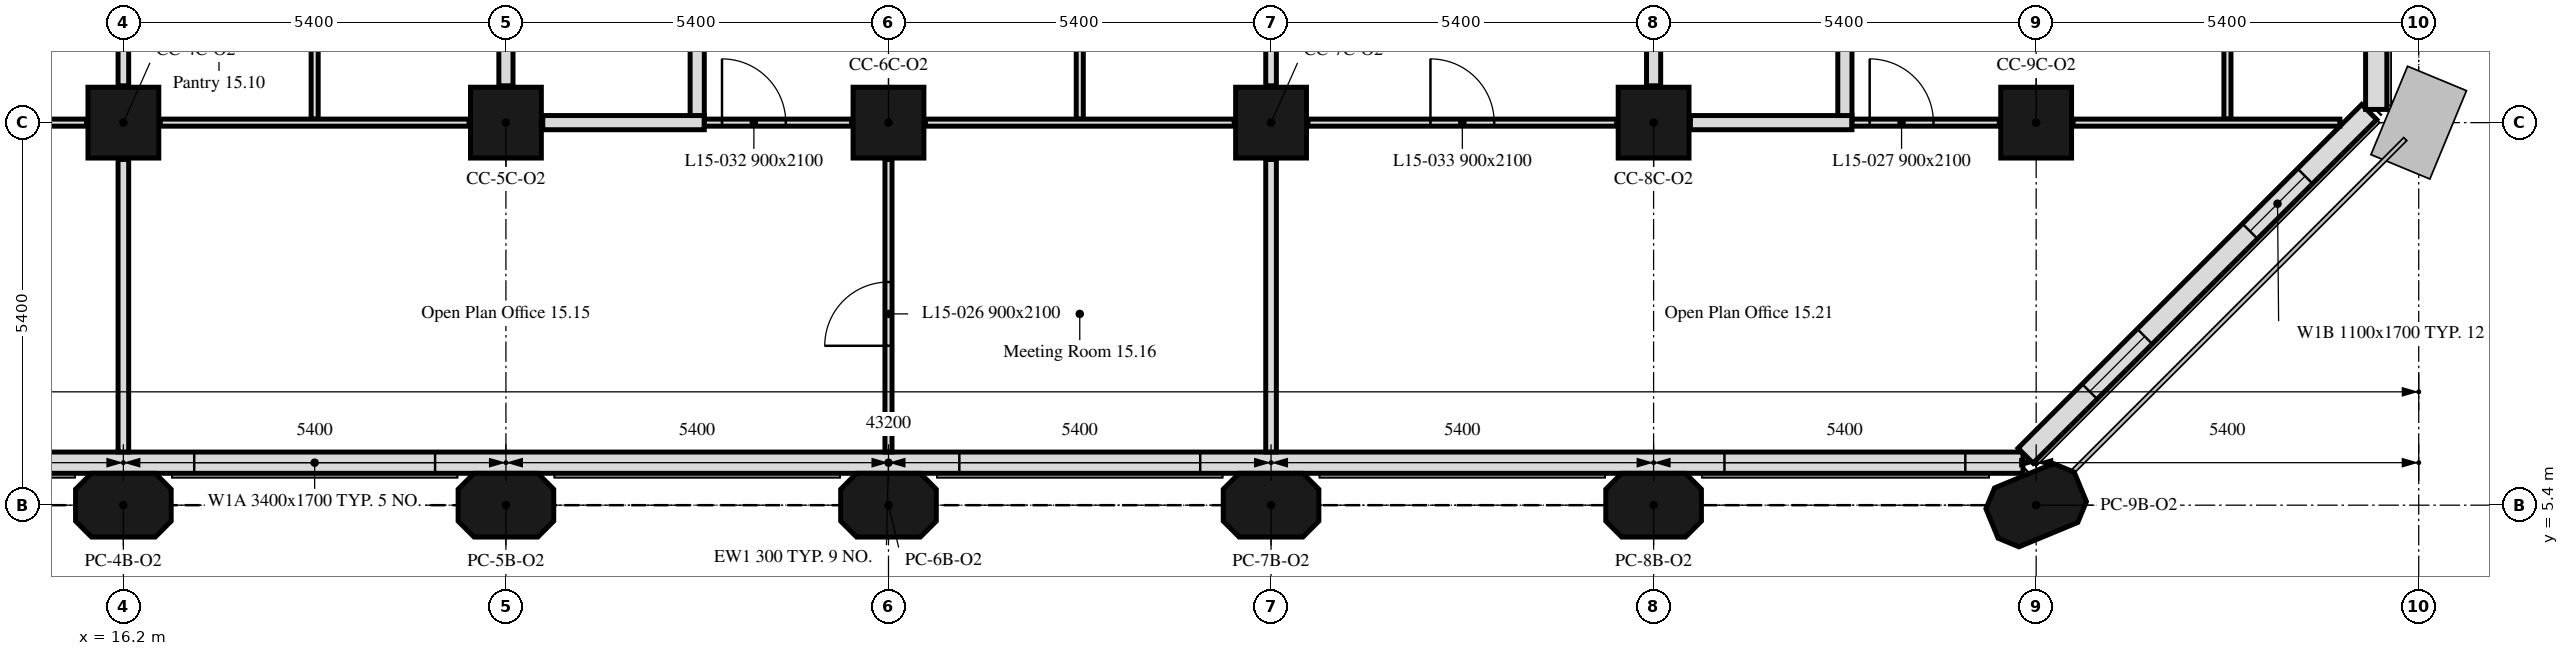
"""IFC4 building model, lengths in metres.
Left out: names, types, materials, properties, quantities, classifications, styles, units other than length and angle.
Written with IfcOpenShell. Run it as: python <this file> out.ifc"""

import sys

from ifc_helpers import new_model, si_unit, direction, frame, frame_2d, origin, origin_2d, place, context, subcontext, project, spatial, polyline, rectangle, outline, extrude, element, fill, save


model = new_model("IFC4")
c1 = context("Model", 3, precision=1e-05, world=origin(), true_north=direction((0.0, 1.0)))
c2 = subcontext(c1, "Body", "Model", "MODEL_VIEW")
j1 = project(units=[si_unit("LENGTHUNIT", "METRE"), si_unit("PLANEANGLEUNIT", "RADIAN")], contexts=[c1])
p1 = place(None, origin())
s1 = spatial("IfcSite", under=j1, at=p1, CompositionType="ELEMENT")
p2 = place(p1, origin())
s2 = spatial("IfcBuilding", under=s1, at=p2, CompositionType="ELEMENT")
p3 = place(p2, frame((0.0, 0.0, 68.8)))
s3 = spatial("IfcBuildingStorey", under=s2, at=p3, CompositionType="ELEMENT", Elevation=68.8)
for number, where, z_axis, x_axis in (
    (1, (16.2, 5.4, 0.0), (0.0, 0.0, 1.0), (1.0, 0.0, 0.0)),
    (2, (21.6, 5.4, 0.0), (0.0, 0.0, 1.0), (1.0, 0.0, 0.0)),
    (3, (27.0, 5.4, 0.0), (0.0, 0.0, 1.0), (1.0, 0.0, 0.0)),
    (4, (32.4, 5.4, 0.0), (0.0, 0.0, 1.0), (1.0, 0.0, 0.0)),
    (5, (37.8, 5.4, 0.0), (0.0, 0.0, 1.0), (1.0, 0.0, 0.0)),
    (6, (43.2, 5.4, 0.0), (0.0, 0.0, 1.0), (0.924, 0.383, 0.0)),
):
    element("IfcColumn", number, at=place(p3, frame(where, z_axis=z_axis, x_axis=x_axis)), inside=s3, PredefinedType="COLUMN", context=c2, shape_type="SweptSolid", body=[
        extrude(outline(polyline([(-0.45, -0.45), (0.45, -0.45), (0.675, -0.225), (0.675, 0.225), (0.45, 0.45), (-0.45, 0.45), (-0.675, 0.225), (-0.675, -0.225), (-0.45, -0.45)])), origin(), (0.0, 0.0, 1.0), 3.5),
    ])
for number, where, z_axis, x_axis in (
    (7, (16.2, 10.8, 0.0), (0.0, 0.0, 1.0), (1.0, 0.0, 0.0)),
    (8, (21.6, 10.8, 0.0), (0.0, 0.0, 1.0), (1.0, 0.0, 0.0)),
    (9, (27.0, 10.8, 0.0), (0.0, 0.0, 1.0), (1.0, 0.0, 0.0)),
    (10, (32.4, 10.8, 0.0), (0.0, 0.0, 1.0), (1.0, 0.0, 0.0)),
    (11, (37.8, 10.8, 0.0), (0.0, 0.0, 1.0), (1.0, 0.0, 0.0)),
    (12, (43.2, 10.8, 0.0), (0.0, 0.0, 1.0), (1.0, 0.0, 0.0)),
):
    element("IfcColumn", number, at=place(p3, frame(where, z_axis=z_axis, x_axis=x_axis)), inside=s3, PredefinedType="COLUMN", context=c2, shape_type="SweptSolid", body=[
        extrude(rectangle(XDim=1.0, YDim=1.0, at=origin_2d()), origin(), (0.0, 0.0, 1.0), 3.5),
    ])
p4 = place(p3, frame((10.986, 6.0, 0.0), z_axis=(0.0, 0.0, 1.0), x_axis=(1.0, 0.0, 0.0)))
e13 = element("IfcWall", 13, at=p4, inside=s3, PredefinedType="SOLIDWALL", context=c2, shape_type="SweptSolid", body=[
    extrude(rectangle(XDim=32.027, YDim=0.3, at=frame_2d((16.014, 0.0))), origin(), (0.0, 0.0, 1.0), 3.5),
])
p5 = place(p4, frame((6.214, 0.0, 0.9)))
e14 = element("IfcOpeningElement", 14, at=p5, cuts=e13, PredefinedType="OPENING", context=c2, shape_type="SweptSolid", body=[
    extrude(rectangle(XDim=3.4, YDim=1.7, at=frame_2d((1.7, 0.85))), frame((0.0, 0.16, 0.0), z_axis=(0.0, -1.0, 0.0), x_axis=(1.0, 0.0, 0.0)), (0.0, 0.0, 1.0), 0.32),
])
p6 = place(p4, frame((17.014, 0.0, 0.9)))
e15 = element("IfcOpeningElement", 15, at=p6, cuts=e13, PredefinedType="OPENING", context=c2, shape_type="SweptSolid", body=[
    extrude(rectangle(XDim=3.4, YDim=1.7, at=frame_2d((1.7, 0.85))), frame((0.0, 0.16, 0.0), z_axis=(0.0, -1.0, 0.0), x_axis=(1.0, 0.0, 0.0)), (0.0, 0.0, 1.0), 0.32),
])
p7 = place(p4, frame((27.814, 0.0, 0.9)))
e16 = element("IfcOpeningElement", 16, at=p7, cuts=e13, PredefinedType="OPENING", context=c2, shape_type="SweptSolid", body=[
    extrude(rectangle(XDim=3.4, YDim=1.7, at=frame_2d((1.7, 0.85))), frame((0.0, 0.16, 0.0), z_axis=(0.0, -1.0, 0.0), x_axis=(1.0, 0.0, 0.0)), (0.0, 0.0, 1.0), 0.32),
])
p8 = place(p3, frame((43.051, 6.099, 0.0), z_axis=(0.0, 0.0, 1.0), x_axis=(0.707106781187, 0.707106781187, 0.0)))
e17 = element("IfcWall", 17, at=p8, inside=s3, PredefinedType="SOLIDWALL", context=c2, shape_type="SweptSolid", body=[
    extrude(rectangle(XDim=6.86, YDim=0.3, at=frame_2d((3.43, 0.0))), origin(), (0.0, 0.0, 1.0), 3.5),
])
p9 = place(p8, frame((1.28, 0.0, 0.9)))
e18 = element("IfcOpeningElement", 18, at=p9, cuts=e17, PredefinedType="OPENING", context=c2, shape_type="SweptSolid", body=[
    extrude(rectangle(XDim=1.1, YDim=1.7, at=frame_2d((0.55, 0.85))), frame((0.0, 0.16, 0.0), z_axis=(0.0, -1.0, 0.0), x_axis=(1.0, 0.0, 0.0)), (0.0, 0.0, 1.0), 0.32),
])
p10 = place(p8, frame((4.48, 0.0, 0.9)))
e19 = element("IfcOpeningElement", 19, at=p10, cuts=e17, PredefinedType="OPENING", context=c2, shape_type="SweptSolid", body=[
    extrude(rectangle(XDim=1.1, YDim=1.7, at=frame_2d((0.55, 0.85))), frame((0.0, 0.16, 0.0), z_axis=(0.0, -1.0, 0.0), x_axis=(1.0, 0.0, 0.0)), (0.0, 0.0, 1.0), 0.32),
])
p11 = place(p3, frame((48.0, 10.986, 0.0), z_axis=(0.0, 0.0, 1.0), x_axis=(0.0, 1.0, 0.0)))
e20 = element("IfcWall", 20, at=p11, inside=s3, PredefinedType="SOLIDWALL", context=c2, shape_type="SweptSolid", body=[
    extrude(rectangle(XDim=32.027, YDim=0.3, at=frame_2d((16.014, 0.0))), origin(), (0.0, 0.0, 1.0), 3.5),
])
p12 = place(p11, frame((27.814, 0.0, 0.9)))
e21 = element("IfcOpeningElement", 21, at=p12, cuts=e20, PredefinedType="OPENING", context=c2, shape_type="SweptSolid", body=[
    extrude(rectangle(XDim=3.4, YDim=1.7, at=frame_2d((1.7, 0.85))), frame((0.0, 0.16, 0.0), z_axis=(0.0, -1.0, 0.0), x_axis=(1.0, 0.0, 0.0)), (0.0, 0.0, 1.0), 0.32),
])
p13 = place(p3, frame((11.32, 10.8, 0.0), z_axis=(0.0, 0.0, 1.0), x_axis=(1.0, 0.0, 0.0)))
e22 = element("IfcWall", 22, at=p13, inside=s3, PredefinedType="PARTITIONING", context=c2, shape_type="SweptSolid", body=[
    extrude(rectangle(XDim=4.36, YDim=0.1, at=frame_2d((2.18, 0.0))), origin(), (0.0, 0.0, 1.0), 3.5),
])
p14 = place(p3, frame((16.2, 11.32, 0.0), z_axis=(0.0, 0.0, 1.0), x_axis=(0.0, 1.0, 0.0)))
e23 = element("IfcWall", 23, at=p14, inside=s3, PredefinedType="PARTITIONING", context=c2, shape_type="SweptSolid", body=[
    extrude(rectangle(XDim=2.105, YDim=0.15, at=frame_2d((1.052, 0.0))), origin(), (0.0, 0.0, 1.0), 3.5),
])
p15 = place(p3, frame((16.2, 6.151, 0.0), z_axis=(0.0, 0.0, 1.0), x_axis=(0.0, 1.0, 0.0)))
e24 = element("IfcWall", 24, at=p15, inside=s3, PredefinedType="PARTITIONING", context=c2, shape_type="SweptSolid", body=[
    extrude(rectangle(XDim=4.129, YDim=0.15, at=frame_2d((2.064, 0.0))), origin(), (0.0, 0.0, 1.0), 3.5),
])
p16 = place(p3, frame((18.9, 10.85, 0.0), z_axis=(0.0, 0.0, 1.0), x_axis=(0.0, 1.0, 0.0)))
e25 = element("IfcWall", 25, at=p16, inside=s3, PredefinedType="PARTITIONING", context=c2, shape_type="SweptSolid", body=[
    extrude(rectangle(XDim=2.575, YDim=0.1, at=frame_2d((1.288, 0.0))), origin(), (0.0, 0.0, 1.0), 3.5),
])
p17 = place(p3, frame((16.72, 10.8, 0.0), z_axis=(0.0, 0.0, 1.0), x_axis=(1.0, 0.0, 0.0)))
e26 = element("IfcWall", 26, at=p17, inside=s3, PredefinedType="PARTITIONING", context=c2, shape_type="SweptSolid", body=[
    extrude(rectangle(XDim=4.36, YDim=0.1, at=frame_2d((2.18, 0.0))), origin(), (0.0, 0.0, 1.0), 3.5),
])
p18 = place(p3, frame((21.6, 11.32, 0.0), z_axis=(0.0, 0.0, 1.0), x_axis=(0.0, 1.0, 0.0)))
e27 = element("IfcWall", 27, at=p18, inside=s3, PredefinedType="PARTITIONING", context=c2, shape_type="SweptSolid", body=[
    extrude(rectangle(XDim=2.08, YDim=0.2, at=frame_2d((1.04, 0.0))), origin(), (0.0, 0.0, 1.0), 3.5),
])
p19 = place(p3, frame((22.12, 10.8, 0.0), z_axis=(0.0, 0.0, 1.0), x_axis=(1.0, 0.0, 0.0)))
e28 = element("IfcWall", 28, at=p19, inside=s3, PredefinedType="PARTITIONING", context=c2, shape_type="SweptSolid", body=[
    extrude(rectangle(XDim=2.28, YDim=0.2, at=frame_2d((1.14, 0.0))), origin(), (0.0, 0.0, 1.0), 3.5),
])
p20 = place(p3, frame((24.3, 10.9, 0.0), z_axis=(0.0, 0.0, 1.0), x_axis=(0.0, 1.0, 0.0)))
e29 = element("IfcWall", 29, at=p20, inside=s3, PredefinedType="PARTITIONING", context=c2, shape_type="SweptSolid", body=[
    extrude(rectangle(XDim=2.5, YDim=0.2, at=frame_2d((1.25, 0.0))), origin(), (0.0, 0.0, 1.0), 3.5),
])
p21 = place(p3, frame((24.4, 10.8, 0.0), z_axis=(0.0, 0.0, 1.0), x_axis=(1.0, 0.0, 0.0)))
e30 = element("IfcWall", 30, at=p21, inside=s3, PredefinedType="PARTITIONING", context=c2, shape_type="SweptSolid", body=[
    extrude(rectangle(XDim=2.08, YDim=0.1, at=frame_2d((1.04, 0.0))), origin(), (0.0, 0.0, 1.0), 3.5),
])
p22 = place(p21, frame((0.25, 0.0, 0.0)))
e31 = element("IfcOpeningElement", 31, at=p22, cuts=e30, PredefinedType="OPENING", context=c2, shape_type="SweptSolid", body=[
    extrude(rectangle(XDim=0.9, YDim=2.1, at=frame_2d((0.45, 1.05))), frame((0.0, 0.05, 0.0), z_axis=(0.0, -1.0, 0.0), x_axis=(1.0, 0.0, 0.0)), (0.0, 0.0, 1.0), 0.1),
])
p23 = place(p3, frame((29.7, 10.85, 0.0), z_axis=(0.0, 0.0, 1.0), x_axis=(0.0, 1.0, 0.0)))
e32 = element("IfcWall", 32, at=p23, inside=s3, PredefinedType="PARTITIONING", context=c2, shape_type="SweptSolid", body=[
    extrude(rectangle(XDim=2.575, YDim=0.1, at=frame_2d((1.288, 0.0))), origin(), (0.0, 0.0, 1.0), 3.5),
])
p24 = place(p23, frame((1.425, 0.0, 0.0)))
e33 = element("IfcOpeningElement", 33, at=p24, cuts=e32, PredefinedType="OPENING", context=c2, shape_type="SweptSolid", body=[
    extrude(rectangle(XDim=0.9, YDim=2.1, at=frame_2d((0.45, 1.05))), frame((0.0, 0.05, 0.0), z_axis=(0.0, -1.0, 0.0), x_axis=(1.0, 0.0, 0.0)), (0.0, 0.0, 1.0), 0.1),
])
p25 = place(p3, frame((27.52, 10.8, 0.0), z_axis=(0.0, 0.0, 1.0), x_axis=(1.0, 0.0, 0.0)))
e34 = element("IfcWall", 34, at=p25, inside=s3, PredefinedType="PARTITIONING", context=c2, shape_type="SweptSolid", body=[
    extrude(rectangle(XDim=4.36, YDim=0.1, at=frame_2d((2.18, 0.0))), origin(), (0.0, 0.0, 1.0), 3.5),
])
p26 = place(p3, frame((32.4, 11.32, 0.0), z_axis=(0.0, 0.0, 1.0), x_axis=(0.0, 1.0, 0.0)))
e35 = element("IfcWall", 35, at=p26, inside=s3, PredefinedType="PARTITIONING", context=c2, shape_type="SweptSolid", body=[
    extrude(rectangle(XDim=2.105, YDim=0.15, at=frame_2d((1.052, 0.0))), origin(), (0.0, 0.0, 1.0), 3.5),
])
p27 = place(p3, frame((27.0, 6.151, 0.0), z_axis=(0.0, 0.0, 1.0), x_axis=(0.0, 1.0, 0.0)))
e36 = element("IfcWall", 36, at=p27, inside=s3, PredefinedType="PARTITIONING", context=c2, shape_type="SweptSolid", body=[
    extrude(rectangle(XDim=4.129, YDim=0.1, at=frame_2d((2.064, 0.0))), origin(), (0.0, 0.0, 1.0), 3.5),
])
p28 = place(p27, frame((1.499, 0.0, 0.0)))
e37 = element("IfcOpeningElement", 37, at=p28, cuts=e36, PredefinedType="OPENING", context=c2, shape_type="SweptSolid", body=[
    extrude(rectangle(XDim=0.9, YDim=2.1, at=frame_2d((0.45, 1.05))), frame((0.0, 0.05, 0.0), z_axis=(0.0, -1.0, 0.0), x_axis=(1.0, 0.0, 0.0)), (0.0, 0.0, 1.0), 0.1),
])
p29 = place(p3, frame((32.4, 6.151, 0.0), z_axis=(0.0, 0.0, 1.0), x_axis=(0.0, 1.0, 0.0)))
e38 = element("IfcWall", 38, at=p29, inside=s3, PredefinedType="PARTITIONING", context=c2, shape_type="SweptSolid", body=[
    extrude(rectangle(XDim=4.129, YDim=0.15, at=frame_2d((2.064, 0.0))), origin(), (0.0, 0.0, 1.0), 3.5),
])
p30 = place(p3, frame((32.92, 10.8, 0.0), z_axis=(0.0, 0.0, 1.0), x_axis=(1.0, 0.0, 0.0)))
e39 = element("IfcWall", 39, at=p30, inside=s3, PredefinedType="PARTITIONING", context=c2, shape_type="SweptSolid", body=[
    extrude(rectangle(XDim=4.36, YDim=0.1, at=frame_2d((2.18, 0.0))), origin(), (0.0, 0.0, 1.0), 3.5),
])
p31 = place(p30, frame((1.73, 0.0, 0.0)))
e40 = element("IfcOpeningElement", 40, at=p31, cuts=e39, PredefinedType="OPENING", context=c2, shape_type="SweptSolid", body=[
    extrude(rectangle(XDim=0.9, YDim=2.1, at=frame_2d((0.45, 1.05))), frame((0.0, 0.05, 0.0), z_axis=(0.0, -1.0, 0.0), x_axis=(1.0, 0.0, 0.0)), (0.0, 0.0, 1.0), 0.1),
])
p32 = place(p3, frame((37.8, 11.32, 0.0), z_axis=(0.0, 0.0, 1.0), x_axis=(0.0, 1.0, 0.0)))
e41 = element("IfcWall", 41, at=p32, inside=s3, PredefinedType="PARTITIONING", context=c2, shape_type="SweptSolid", body=[
    extrude(rectangle(XDim=2.08, YDim=0.2, at=frame_2d((1.04, 0.0))), origin(), (0.0, 0.0, 1.0), 3.5),
])
p33 = place(p3, frame((38.32, 10.8, 0.0), z_axis=(0.0, 0.0, 1.0), x_axis=(1.0, 0.0, 0.0)))
e42 = element("IfcWall", 42, at=p33, inside=s3, PredefinedType="PARTITIONING", context=c2, shape_type="SweptSolid", body=[
    extrude(rectangle(XDim=2.28, YDim=0.2, at=frame_2d((1.14, 0.0))), origin(), (0.0, 0.0, 1.0), 3.5),
])
p34 = place(p3, frame((40.5, 10.9, 0.0), z_axis=(0.0, 0.0, 1.0), x_axis=(0.0, 1.0, 0.0)))
e43 = element("IfcWall", 43, at=p34, inside=s3, PredefinedType="PARTITIONING", context=c2, shape_type="SweptSolid", body=[
    extrude(rectangle(XDim=2.5, YDim=0.2, at=frame_2d((1.25, 0.0))), origin(), (0.0, 0.0, 1.0), 3.5),
])
p35 = place(p3, frame((40.6, 10.8, 0.0), z_axis=(0.0, 0.0, 1.0), x_axis=(1.0, 0.0, 0.0)))
e44 = element("IfcWall", 44, at=p35, inside=s3, PredefinedType="PARTITIONING", context=c2, shape_type="SweptSolid", body=[
    extrude(rectangle(XDim=2.08, YDim=0.1, at=frame_2d((1.04, 0.0))), origin(), (0.0, 0.0, 1.0), 3.5),
])
p36 = place(p35, frame((0.25, 0.0, 0.0)))
e45 = element("IfcOpeningElement", 45, at=p36, cuts=e44, PredefinedType="OPENING", context=c2, shape_type="SweptSolid", body=[
    extrude(rectangle(XDim=0.9, YDim=2.1, at=frame_2d((0.45, 1.05))), frame((0.0, 0.05, 0.0), z_axis=(0.0, -1.0, 0.0), x_axis=(1.0, 0.0, 0.0)), (0.0, 0.0, 1.0), 0.1),
])
p37 = place(p3, frame((45.9, 10.85, 0.0), z_axis=(0.0, 0.0, 1.0), x_axis=(0.0, 1.0, 0.0)))
e46 = element("IfcWall", 46, at=p37, inside=s3, PredefinedType="PARTITIONING", context=c2, shape_type="SweptSolid", body=[
    extrude(rectangle(XDim=2.575, YDim=0.1, at=frame_2d((1.288, 0.0))), origin(), (0.0, 0.0, 1.0), 3.5),
])
p38 = place(p3, frame((43.72, 10.8, 0.0), z_axis=(0.0, 0.0, 1.0), x_axis=(1.0, 0.0, 0.0)))
e47 = element("IfcWall", 47, at=p38, inside=s3, PredefinedType="PARTITIONING", context=c2, shape_type="SweptSolid", body=[
    extrude(rectangle(XDim=3.768, YDim=0.1, at=frame_2d((1.884, 0.0))), origin(), (0.0, 0.0, 1.0), 3.5),
])
p39 = place(p5, origin())
e48 = element("IfcWindow", 48, at=p39, inside=s3, PartitioningType="SINGLE_PANEL", PredefinedType="WINDOW", context=c2, shape_type="SweptSolid", body=[
    extrude(rectangle(XDim=3.4, YDim=1.7, at=frame_2d((1.7, 0.85))), frame((0.0, 0.03, 0.0), z_axis=(0.0, -1.0, 0.0), x_axis=(1.0, 0.0, 0.0)), (0.0, 0.0, 1.0), 0.06),
])
fill(e14, e48)
p40 = place(p6, origin())
e49 = element("IfcWindow", 49, at=p40, inside=s3, PartitioningType="SINGLE_PANEL", PredefinedType="WINDOW", context=c2, shape_type="SweptSolid", body=[
    extrude(rectangle(XDim=3.4, YDim=1.7, at=frame_2d((1.7, 0.85))), frame((0.0, 0.03, 0.0), z_axis=(0.0, -1.0, 0.0), x_axis=(1.0, 0.0, 0.0)), (0.0, 0.0, 1.0), 0.06),
])
fill(e15, e49)
p41 = place(p7, origin())
e50 = element("IfcWindow", 50, at=p41, inside=s3, PartitioningType="SINGLE_PANEL", PredefinedType="WINDOW", context=c2, shape_type="SweptSolid", body=[
    extrude(rectangle(XDim=3.4, YDim=1.7, at=frame_2d((1.7, 0.85))), frame((0.0, 0.03, 0.0), z_axis=(0.0, -1.0, 0.0), x_axis=(1.0, 0.0, 0.0)), (0.0, 0.0, 1.0), 0.06),
])
fill(e16, e50)
p42 = place(p9, origin())
e51 = element("IfcWindow", 51, at=p42, inside=s3, PartitioningType="SINGLE_PANEL", PredefinedType="WINDOW", context=c2, shape_type="SweptSolid", body=[
    extrude(rectangle(XDim=1.1, YDim=1.7, at=frame_2d((0.55, 0.85))), frame((0.0, 0.03, 0.0), z_axis=(0.0, -1.0, 0.0), x_axis=(1.0, 0.0, 0.0)), (0.0, 0.0, 1.0), 0.06),
])
fill(e18, e51)
p43 = place(p10, origin())
e52 = element("IfcWindow", 52, at=p43, inside=s3, PartitioningType="SINGLE_PANEL", PredefinedType="WINDOW", context=c2, shape_type="SweptSolid", body=[
    extrude(rectangle(XDim=1.1, YDim=1.7, at=frame_2d((0.55, 0.85))), frame((0.0, 0.03, 0.0), z_axis=(0.0, -1.0, 0.0), x_axis=(1.0, 0.0, 0.0)), (0.0, 0.0, 1.0), 0.06),
])
fill(e19, e52)
p44 = place(p28, origin())
e53 = element("IfcDoor", 53, at=p44, inside=s3, OperationType="SINGLE_SWING_LEFT", PredefinedType="DOOR", context=c2, shape_type="SweptSolid", body=[
    extrude(rectangle(XDim=0.9, YDim=2.1, at=frame_2d((0.45, 1.05))), frame((0.0, 0.025, 0.0), z_axis=(0.0, -1.0, 0.0), x_axis=(1.0, 0.0, 0.0)), (0.0, 0.0, 1.0), 0.05),
])
fill(e37, e53)
p45 = place(p36, origin())
e54 = element("IfcDoor", 54, at=p45, inside=s3, OperationType="SINGLE_SWING_LEFT", PredefinedType="DOOR", context=c2, shape_type="SweptSolid", body=[
    extrude(rectangle(XDim=0.9, YDim=2.1, at=frame_2d((0.45, 1.05))), frame((0.0, 0.025, 0.0), z_axis=(0.0, -1.0, 0.0), x_axis=(1.0, 0.0, 0.0)), (0.0, 0.0, 1.0), 0.05),
])
fill(e45, e54)
p46 = place(p22, origin())
e55 = element("IfcDoor", 55, at=p46, inside=s3, OperationType="SINGLE_SWING_LEFT", PredefinedType="DOOR", context=c2, shape_type="SweptSolid", body=[
    extrude(rectangle(XDim=0.9, YDim=2.1, at=frame_2d((0.45, 1.05))), frame((0.0, 0.025, 0.0), z_axis=(0.0, -1.0, 0.0), x_axis=(1.0, 0.0, 0.0)), (0.0, 0.0, 1.0), 0.05),
])
fill(e31, e55)
p47 = place(p31, origin())
e56 = element("IfcDoor", 56, at=p47, inside=s3, OperationType="SINGLE_SWING_RIGHT", PredefinedType="DOOR", context=c2, shape_type="SweptSolid", body=[
    extrude(rectangle(XDim=0.9, YDim=2.1, at=frame_2d((0.45, 1.05))), frame((0.0, 0.025, 0.0), z_axis=(0.0, -1.0, 0.0), x_axis=(1.0, 0.0, 0.0)), (0.0, 0.0, 1.0), 0.05),
])
fill(e40, e56)
save(model, sys.argv[1])
